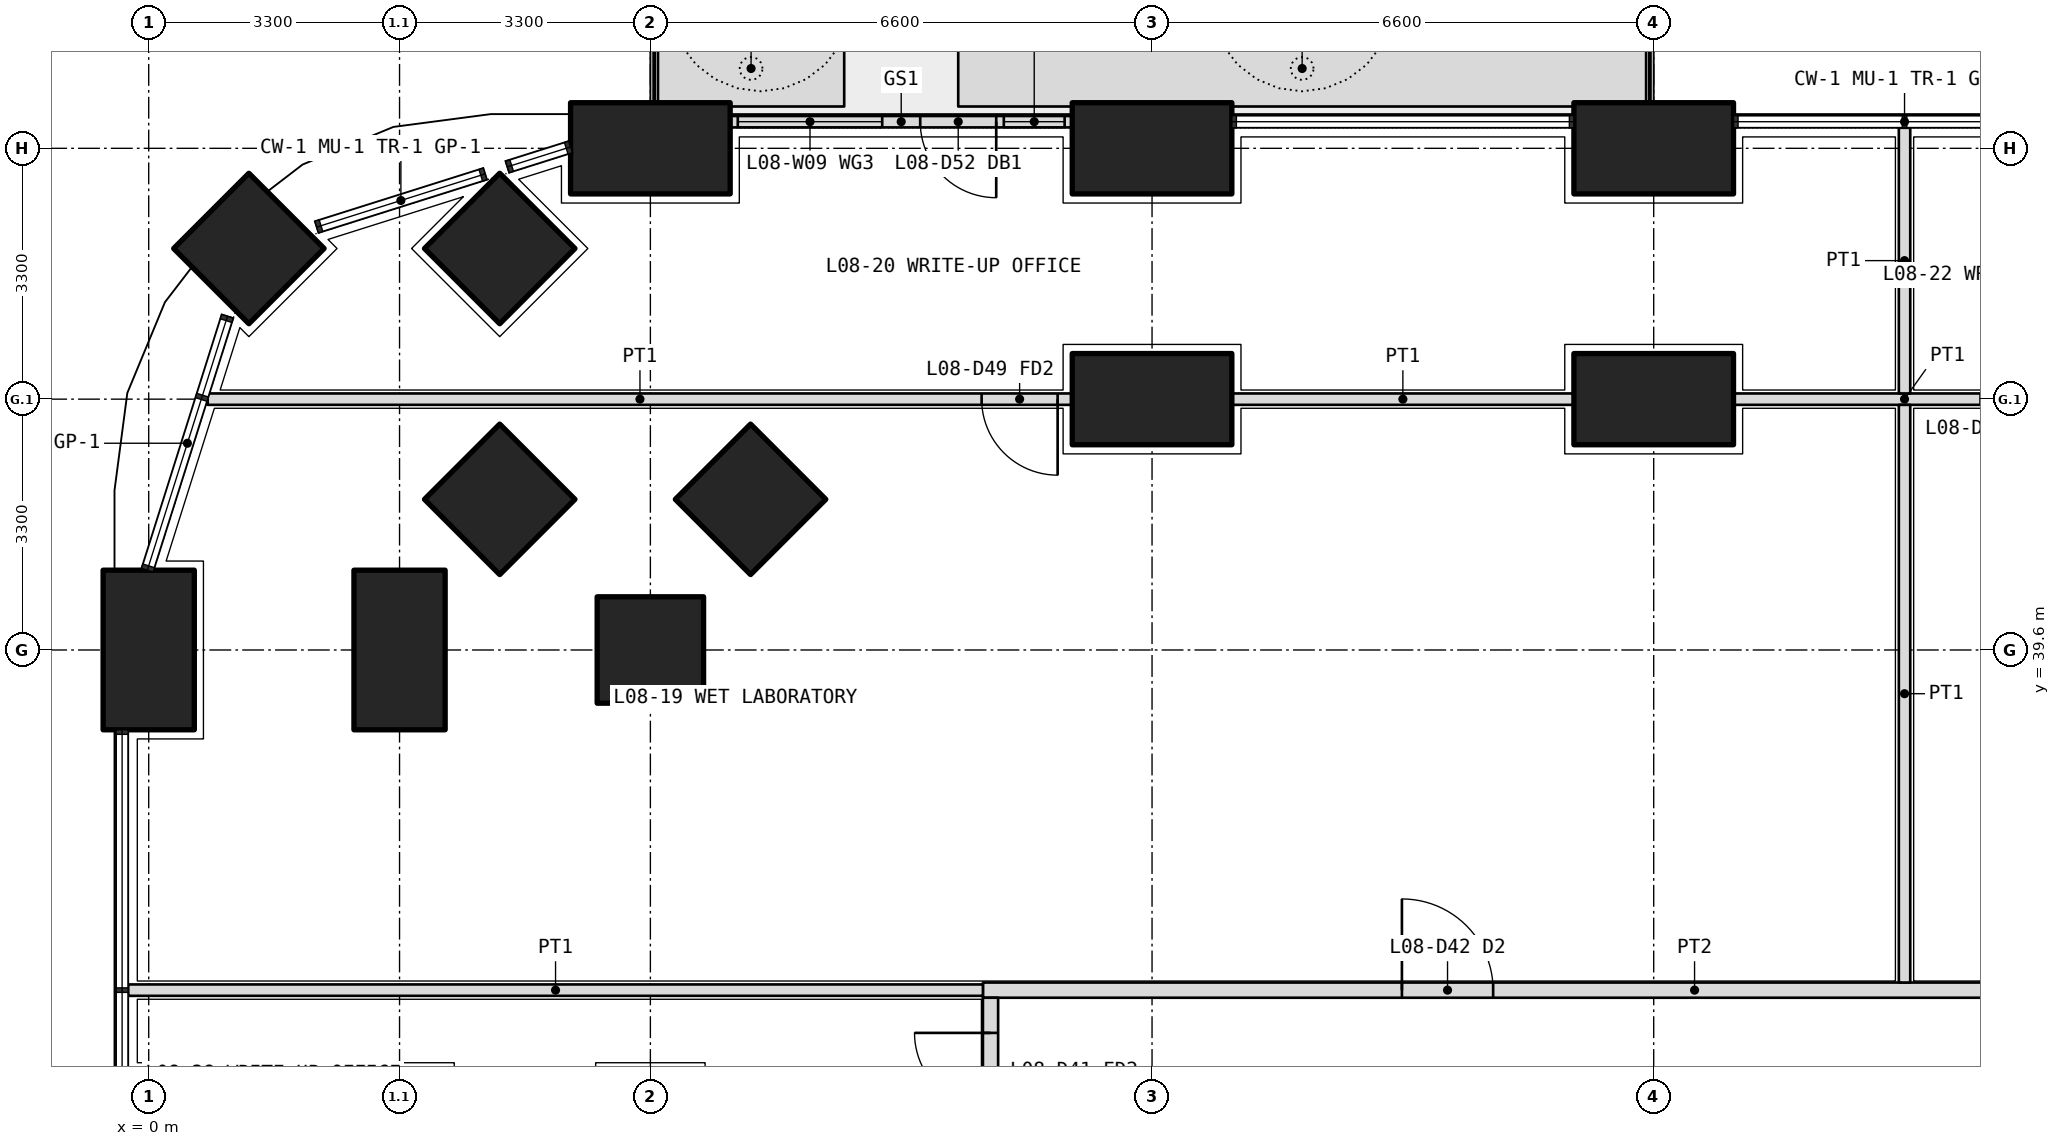
"""IFC4 building model, lengths in metres.
Left out: names, types, materials, properties, quantities, classifications, styles, units other than length and angle.
Written with IfcOpenShell. Run it as: python <this file> out.ifc"""

import sys

from ifc_helpers import new_model, si_unit, direction, frame, frame_2d, origin, origin_2d, place, context, subcontext, project, spatial, polyline, rectangle, outline, extrude, element, fill, save


model = new_model("IFC4")
c1 = context("Model", 3, precision=1e-05, world=origin(), true_north=direction((0.0, 1.0)))
c2 = subcontext(c1, "Body", "Model", "MODEL_VIEW")
j1 = project(units=[si_unit("LENGTHUNIT", "METRE"), si_unit("PLANEANGLEUNIT", "RADIAN")], contexts=[c1])
p1 = place(None, origin())
s1 = spatial("IfcSite", under=j1, at=p1, CompositionType="ELEMENT")
p2 = place(p1, origin())
s2 = spatial("IfcBuilding", under=s1, at=p2, CompositionType="ELEMENT")
p3 = place(p2, frame((0.0, 0.0, 38.1)))
s3 = spatial("IfcBuildingStorey", under=s2, at=p3, CompositionType="ELEMENT", Elevation=38.1)
p4 = place(p3, frame((1.318, 44.882, 0.0), z_axis=(0.0, 0.0, 1.0), x_axis=(0.707106781187, 0.707106781187, 0.0)))
e1 = element("IfcColumn", 1, at=p4, inside=s3, PredefinedType="COLUMN", context=c2, shape_type="SweptSolid", body=[
    extrude(rectangle(XDim=1.4, YDim=1.4, at=origin_2d()), origin(), (0.0, 0.0, 1.0), 4.2),
])
for number, where, z_axis, x_axis in (
    (2, (0.0, 39.6, 0.0), (0.0, 0.0, 1.0), (0.0, 1.0, 0.0)),
    (3, (6.6, 46.2, 0.0), (0.0, 0.0, 1.0), (1.0, 0.0, 0.0)),
    (4, (13.2, 46.2, 0.0), (0.0, 0.0, 1.0), (1.0, 0.0, 0.0)),
    (5, (19.8, 46.2, 0.0), (0.0, 0.0, 1.0), (1.0, 0.0, 0.0)),
):
    element("IfcColumn", number, at=place(p3, frame(where, z_axis=z_axis, x_axis=x_axis)), inside=s3, PredefinedType="COLUMN", context=c2, shape_type="SweptSolid", body=[
        extrude(rectangle(XDim=2.1, YDim=1.2, at=origin_2d()), origin(), (0.0, 0.0, 1.0), 4.2),
    ])
for number, where, z_axis, x_axis in (
    (6, (6.6, 39.6, 0.0), (0.0, 0.0, 1.0), (1.0, 0.0, 0.0)),
    (7, (4.618, 44.882, 0.0), (0.0, 0.0, 1.0), (0.707, 0.707, 0.0)),
):
    element("IfcColumn", number, at=place(p3, frame(where, z_axis=z_axis, x_axis=x_axis)), inside=s3, PredefinedType="COLUMN", context=c2, shape_type="SweptSolid", body=[
        extrude(rectangle(XDim=1.4, YDim=1.4, at=origin_2d()), origin(), (0.0, 0.0, 1.0), 4.2),
    ])
p5 = place(p3, frame((3.3, 39.6, 0.0), z_axis=(0.0, 0.0, 1.0), x_axis=(0.0, 1.0, 0.0)))
e8 = element("IfcColumn", 8, at=p5, inside=s3, PredefinedType="COLUMN", context=c2, shape_type="SweptSolid", body=[
    extrude(rectangle(XDim=2.1, YDim=1.2, at=origin_2d()), origin(), (0.0, 0.0, 1.0), 4.2),
])
p6 = place(p3, frame((4.618, 41.582, 0.0), z_axis=(0.0, 0.0, 1.0), x_axis=(0.707106781187, 0.707106781187, 0.0)))
e9 = element("IfcColumn", 9, at=p6, inside=s3, PredefinedType="COLUMN", context=c2, shape_type="SweptSolid", body=[
    extrude(rectangle(XDim=1.4, YDim=1.4, at=origin_2d()), origin(), (0.0, 0.0, 1.0), 4.2),
])
for number, where, z_axis, x_axis in (
    (10, (13.2, 42.9, 0.0), (0.0, 0.0, 1.0), (1.0, 0.0, 0.0)),
    (11, (19.8, 42.9, 0.0), (0.0, 0.0, 1.0), (1.0, 0.0, 0.0)),
):
    element("IfcColumn", number, at=place(p3, frame(where, z_axis=z_axis, x_axis=x_axis)), inside=s3, PredefinedType="COLUMN", context=c2, shape_type="SweptSolid", body=[
        extrude(rectangle(XDim=2.1, YDim=1.2, at=origin_2d()), origin(), (0.0, 0.0, 1.0), 4.2),
    ])
p7 = place(p3, frame((7.918, 41.582, 0.0), z_axis=(0.0, 0.0, 1.0), x_axis=(0.707106781187, 0.707106781187, 0.0)))
e12 = element("IfcColumn", 12, at=p7, inside=s3, PredefinedType="COLUMN", context=c2, shape_type="SweptSolid", body=[
    extrude(rectangle(XDim=1.4, YDim=1.4, at=origin_2d()), origin(), (0.0, 0.0, 1.0), 4.2),
])
p8 = place(p3, origin())
e13 = element("IfcWall", 13, at=p8, inside=s3, PredefinedType="USERDEFINED", context=c2, shape_type="SweptSolid", body=[
    extrude(outline(polyline([(6.7, 46.75), (9.15, 46.75), (9.15, 47.75), (6.7, 47.75), (6.7, 46.75)]), holes=[polyline([(6.85, 46.9), (9.0, 46.9), (9.0, 47.6), (6.85, 47.6), (6.85, 46.9)])]), origin(), (0.0, 0.0, 1.0), 1.05),
])
p9 = place(p3, origin())
e14 = element("IfcWall", 14, at=p9, inside=s3, PredefinedType="USERDEFINED", context=c2, shape_type="SweptSolid", body=[
    extrude(outline(polyline([(10.65, 46.75), (19.7, 46.75), (19.7, 47.75), (10.65, 47.75), (10.65, 46.75)]), holes=[polyline([(10.8, 46.9), (19.55, 46.9), (19.55, 47.6), (10.8, 47.6), (10.8, 46.9)])]), origin(), (0.0, 0.0, 1.0), 1.05),
])
p10 = place(p3, frame((12.15, 46.55, 0.0), z_axis=(0.0, 0.0, 1.0), x_axis=(-1.0, 0.0, 0.0)))
e15 = element("IfcWall", 15, at=p10, inside=s3, PredefinedType="SOLIDWALL", context=c2, shape_type="SweptSolid", body=[
    extrude(rectangle(XDim=4.5, YDim=0.15, at=frame_2d((2.25, 0.0))), origin(), (0.0, 0.0, 1.0), 2.7),
])
p11 = place(p10, frame((1.0, 0.0, 0.0)))
e16 = element("IfcOpeningElement", 16, at=p11, cuts=e15, PredefinedType="OPENING", context=c2, shape_type="SweptSolid", body=[
    extrude(rectangle(XDim=1.0, YDim=2.4, at=frame_2d((0.5, 1.2))), frame((0.0, 0.085, 0.0), z_axis=(0.0, -1.0, 0.0), x_axis=(1.0, 0.0, 0.0)), (0.0, 0.0, 1.0), 0.17),
])
p12 = place(p10, frame((0.1, 0.0, 0.1)))
e17 = element("IfcOpeningElement", 17, at=p12, cuts=e15, PredefinedType="OPENING", context=c2, shape_type="SweptSolid", body=[
    extrude(rectangle(XDim=0.8, YDim=2.3, at=frame_2d((0.4, 1.15))), frame((0.0, 0.085, 0.0), z_axis=(0.0, -1.0, 0.0), x_axis=(1.0, 0.0, 0.0)), (0.0, 0.0, 1.0), 0.17),
])
p13 = place(p10, frame((2.5, 0.0, 0.1)))
e18 = element("IfcOpeningElement", 18, at=p13, cuts=e15, PredefinedType="OPENING", context=c2, shape_type="SweptSolid", body=[
    extrude(rectangle(XDim=1.9, YDim=2.3, at=frame_2d((0.95, 1.15))), frame((0.0, 0.085, 0.0), z_axis=(0.0, -1.0, 0.0), x_axis=(1.0, 0.0, 0.0)), (0.0, 0.0, 1.0), 0.17),
])
p14 = place(p3, frame((10.975, 35.125, 0.0), z_axis=(0.0, 0.0, 1.0), x_axis=(1.0, 0.0, 0.0)))
e19 = element("IfcWall", 19, at=p14, inside=s3, PredefinedType="PARTITIONING", context=c2, shape_type="SweptSolid", body=[
    extrude(rectangle(XDim=18.725, YDim=0.2, at=frame_2d((9.362, 0.0))), origin(), (0.0, 0.0, 1.0), 2.85),
])
p15 = place(p14, frame((5.512, 0.0, 0.0)))
e20 = element("IfcOpeningElement", 20, at=p15, cuts=e19, PredefinedType="OPENING", context=c2, shape_type="SweptSolid", body=[
    extrude(rectangle(XDim=1.2, YDim=2.1, at=frame_2d((0.6, 1.05))), frame((0.0, 0.11, 0.0), z_axis=(0.0, -1.0, 0.0), x_axis=(1.0, 0.0, 0.0)), (0.0, 0.0, 1.0), 0.22),
])
p16 = place(p14, frame((14.925, 0.0, 0.0)))
e21 = element("IfcOpeningElement", 21, at=p16, cuts=e19, PredefinedType="OPENING", context=c2, shape_type="SweptSolid", body=[
    extrude(rectangle(XDim=1.0, YDim=2.1, at=frame_2d((0.5, 1.05))), frame((0.0, 0.11, 0.0), z_axis=(0.0, -1.0, 0.0), x_axis=(1.0, 0.0, 0.0)), (0.0, 0.0, 1.0), 0.22),
])
p17 = place(p3, frame((11.075, 11.175, 0.0), z_axis=(0.0, 0.0, 1.0), x_axis=(0.0, 1.0, 0.0)))
e22 = element("IfcWall", 22, at=p17, inside=s3, PredefinedType="PARTITIONING", context=c2, shape_type="SweptSolid", body=[
    extrude(rectangle(XDim=23.85, YDim=0.2, at=frame_2d((11.925, 0.0))), origin(), (0.0, 0.0, 1.0), 2.85),
])
p18 = place(p17, frame((0.363, 0.0, 0.0)))
e23 = element("IfcOpeningElement", 23, at=p18, cuts=e22, PredefinedType="OPENING", context=c2, shape_type="SweptSolid", body=[
    extrude(rectangle(XDim=1.2, YDim=2.1, at=frame_2d((0.6, 1.05))), frame((0.0, 0.11, 0.0), z_axis=(0.0, -1.0, 0.0), x_axis=(1.0, 0.0, 0.0)), (0.0, 0.0, 1.0), 0.22),
])
p19 = place(p17, frame((2.575, 0.0, 0.0)))
e24 = element("IfcOpeningElement", 24, at=p19, cuts=e22, PredefinedType="OPENING", context=c2, shape_type="SweptSolid", body=[
    extrude(rectangle(XDim=1.0, YDim=2.1, at=frame_2d((0.5, 1.05))), frame((0.0, 0.11, 0.0), z_axis=(0.0, -1.0, 0.0), x_axis=(1.0, 0.0, 0.0)), (0.0, 0.0, 1.0), 0.22),
])
p20 = place(p17, frame((5.625, 0.0, 0.0)))
e25 = element("IfcOpeningElement", 25, at=p20, cuts=e22, PredefinedType="OPENING", context=c2, shape_type="SweptSolid", body=[
    extrude(rectangle(XDim=0.9, YDim=2.1, at=frame_2d((0.45, 1.05))), frame((0.0, 0.11, 0.0), z_axis=(0.0, -1.0, 0.0), x_axis=(1.0, 0.0, 0.0)), (0.0, 0.0, 1.0), 0.22),
])
p21 = place(p17, frame((9.425, 0.0, 0.0)))
e26 = element("IfcOpeningElement", 26, at=p21, cuts=e22, PredefinedType="OPENING", context=c2, shape_type="SweptSolid", body=[
    extrude(rectangle(XDim=0.9, YDim=2.1, at=frame_2d((0.45, 1.05))), frame((0.0, 0.11, 0.0), z_axis=(0.0, -1.0, 0.0), x_axis=(1.0, 0.0, 0.0)), (0.0, 0.0, 1.0), 0.22),
])
p22 = place(p17, frame((12.975, 0.0, 0.0)))
e27 = element("IfcOpeningElement", 27, at=p22, cuts=e22, PredefinedType="OPENING", context=c2, shape_type="SweptSolid", body=[
    extrude(rectangle(XDim=1.0, YDim=2.1, at=frame_2d((0.5, 1.05))), frame((0.0, 0.11, 0.0), z_axis=(0.0, -1.0, 0.0), x_axis=(1.0, 0.0, 0.0)), (0.0, 0.0, 1.0), 0.22),
])
p23 = place(p17, frame((16.375, 0.0, 0.0)))
e28 = element("IfcOpeningElement", 28, at=p23, cuts=e22, PredefinedType="OPENING", context=c2, shape_type="SweptSolid", body=[
    extrude(rectangle(XDim=1.0, YDim=2.1, at=frame_2d((0.5, 1.05))), frame((0.0, 0.11, 0.0), z_axis=(0.0, -1.0, 0.0), x_axis=(1.0, 0.0, 0.0)), (0.0, 0.0, 1.0), 0.22),
])
p24 = place(p17, frame((19.675, 0.0, 0.0)))
e29 = element("IfcOpeningElement", 29, at=p24, cuts=e22, PredefinedType="OPENING", context=c2, shape_type="SweptSolid", body=[
    extrude(rectangle(XDim=1.0, YDim=2.1, at=frame_2d((0.5, 1.05))), frame((0.0, 0.11, 0.0), z_axis=(0.0, -1.0, 0.0), x_axis=(1.0, 0.0, 0.0)), (0.0, 0.0, 1.0), 0.22),
])
p25 = place(p17, frame((22.387, 0.0, 0.0)))
e30 = element("IfcOpeningElement", 30, at=p25, cuts=e22, PredefinedType="OPENING", context=c2, shape_type="SweptSolid", body=[
    extrude(rectangle(XDim=1.0, YDim=2.1, at=frame_2d((0.5, 1.05))), frame((0.0, 0.11, 0.0), z_axis=(0.0, -1.0, 0.0), x_axis=(1.0, 0.0, 0.0)), (0.0, 0.0, 1.0), 0.22),
])
p26 = place(p3, frame((-0.27, 35.125, 0.0), z_axis=(0.0, 0.0, 1.0), x_axis=(1.0, 0.0, 0.0)))
e31 = element("IfcWall", 31, at=p26, inside=s3, PredefinedType="PARTITIONING", context=c2, shape_type="SweptSolid", body=[
    extrude(rectangle(XDim=11.245, YDim=0.15, at=frame_2d((5.623, 0.0))), origin(), (0.0, 0.0, 1.0), 2.7),
])
p27 = place(p3, frame((25.35, 42.9, 0.0), z_axis=(0.0, 0.0, 1.0), x_axis=(-1.0, 0.0, 0.0)))
e32 = element("IfcWall", 32, at=p27, inside=s3, PredefinedType="PARTITIONING", context=c2, shape_type="SweptSolid", body=[
    extrude(rectangle(XDim=4.5, YDim=0.15, at=frame_2d((2.25, 0.0))), origin(), (0.0, 0.0, 1.0), 3.9),
])
p28 = place(p27, frame((0.25, 0.0, 0.0)))
e33 = element("IfcOpeningElement", 33, at=p28, cuts=e32, PredefinedType="OPENING", context=c2, shape_type="SweptSolid", body=[
    extrude(rectangle(XDim=1.0, YDim=2.1, at=frame_2d((0.5, 1.05))), frame((0.0, 0.085, 0.0), z_axis=(0.0, -1.0, 0.0), x_axis=(1.0, 0.0, 0.0)), (0.0, 0.0, 1.0), 0.17),
])
p29 = place(p3, frame((18.75, 42.9, 0.0), z_axis=(0.0, 0.0, 1.0), x_axis=(-1.0, 0.0, 0.0)))
e34 = element("IfcWall", 34, at=p29, inside=s3, PredefinedType="PARTITIONING", context=c2, shape_type="SweptSolid", body=[
    extrude(rectangle(XDim=4.5, YDim=0.15, at=frame_2d((2.25, 0.0))), origin(), (0.0, 0.0, 1.0), 3.9),
])
p30 = place(p3, frame((12.15, 42.9, 0.0), z_axis=(0.0, 0.0, 1.0), x_axis=(-1.0, 0.0, 0.0)))
e35 = element("IfcWall", 35, at=p30, inside=s3, PredefinedType="PARTITIONING", context=c2, shape_type="SweptSolid", body=[
    extrude(rectangle(XDim=11.374, YDim=0.15, at=frame_2d((5.687, 0.0))), origin(), (0.0, 0.0, 1.0), 2.7),
])
p31 = place(p30, frame((0.192, 0.0, 0.0)))
e36 = element("IfcOpeningElement", 36, at=p31, cuts=e35, PredefinedType="OPENING", context=c2, shape_type="SweptSolid", body=[
    extrude(rectangle(XDim=1.0, YDim=2.1, at=frame_2d((0.5, 1.05))), frame((0.0, 0.085, 0.0), z_axis=(0.0, -1.0, 0.0), x_axis=(1.0, 0.0, 0.0)), (0.0, 0.0, 1.0), 0.17),
])
p32 = place(p3, frame((23.1, 46.47, 0.0), z_axis=(0.0, 0.0, 1.0), x_axis=(0.0, -1.0, 0.0)))
e37 = element("IfcWall", 37, at=p32, inside=s3, PredefinedType="PARTITIONING", context=c2, shape_type="SweptSolid", body=[
    extrude(rectangle(XDim=3.495, YDim=0.15, at=frame_2d((1.748, 0.0))), origin(), (0.0, 0.0, 1.0), 2.7),
])
p33 = place(p3, frame((23.1, 42.825, 0.0), z_axis=(0.0, 0.0, 1.0), x_axis=(0.0, -1.0, 0.0)))
e38 = element("IfcWall", 38, at=p33, inside=s3, PredefinedType="PARTITIONING", context=c2, shape_type="SweptSolid", body=[
    extrude(rectangle(XDim=7.6, YDim=0.15, at=frame_2d((3.8, 0.0))), origin(), (0.0, 0.0, 1.0), 3.9),
])
p34 = place(p11, origin())
e39 = element("IfcDoor", 39, at=p34, inside=s3, OperationType="SINGLE_SWING_LEFT", PredefinedType="DOOR", context=c2, shape_type="SweptSolid", body=[
    extrude(rectangle(XDim=1.0, YDim=2.4, at=frame_2d((0.5, 1.2))), frame((0.0, 0.025, 0.0), z_axis=(0.0, -1.0, 0.0), x_axis=(1.0, 0.0, 0.0)), (0.0, 0.0, 1.0), 0.05),
])
fill(e16, e39)
p35 = place(p12, origin())
e40 = element("IfcWindow", 40, at=p35, inside=s3, PartitioningType="SINGLE_PANEL", PredefinedType="WINDOW", context=c2, shape_type="SweptSolid", body=[
    extrude(rectangle(XDim=0.8, YDim=2.3, at=frame_2d((0.4, 1.15))), frame((0.0, 0.03, 0.0), z_axis=(0.0, -1.0, 0.0), x_axis=(1.0, 0.0, 0.0)), (0.0, 0.0, 1.0), 0.06),
])
fill(e17, e40)
p36 = place(p13, origin())
e41 = element("IfcWindow", 41, at=p36, inside=s3, PartitioningType="SINGLE_PANEL", PredefinedType="WINDOW", context=c2, shape_type="SweptSolid", body=[
    extrude(rectangle(XDim=1.9, YDim=2.3, at=frame_2d((0.95, 1.15))), frame((0.0, 0.03, 0.0), z_axis=(0.0, -1.0, 0.0), x_axis=(1.0, 0.0, 0.0)), (0.0, 0.0, 1.0), 0.06),
])
fill(e18, e41)
p37 = place(p15, origin())
e42 = element("IfcDoor", 42, at=p37, inside=s3, OperationType="DOUBLE_DOOR_SINGLE_SWING", PredefinedType="DOOR", context=c2, shape_type="SweptSolid", body=[
    extrude(rectangle(XDim=1.2, YDim=2.1, at=frame_2d((0.6, 1.05))), frame((0.0, 0.025, 0.0), z_axis=(0.0, -1.0, 0.0), x_axis=(1.0, 0.0, 0.0)), (0.0, 0.0, 1.0), 0.05),
])
fill(e20, e42)
p38 = place(p31, origin())
e43 = element("IfcDoor", 43, at=p38, inside=s3, OperationType="SINGLE_SWING_LEFT", PredefinedType="DOOR", context=c2, shape_type="SweptSolid", body=[
    extrude(rectangle(XDim=1.0, YDim=2.1, at=frame_2d((0.5, 1.05))), frame((0.0, 0.025, 0.0), z_axis=(0.0, -1.0, 0.0), x_axis=(1.0, 0.0, 0.0)), (0.0, 0.0, 1.0), 0.05),
])
fill(e36, e43)
p39 = place(p25, origin())
e44 = element("IfcDoor", 44, at=p39, inside=s3, OperationType="SINGLE_SWING_RIGHT", PredefinedType="DOOR", context=c2, shape_type="SweptSolid", body=[
    extrude(rectangle(XDim=1.0, YDim=2.1, at=frame_2d((0.5, 1.05))), frame((0.0, 0.025, 0.0), z_axis=(0.0, -1.0, 0.0), x_axis=(1.0, 0.0, 0.0)), (0.0, 0.0, 1.0), 0.05),
])
fill(e30, e44)
save(model, sys.argv[1])
